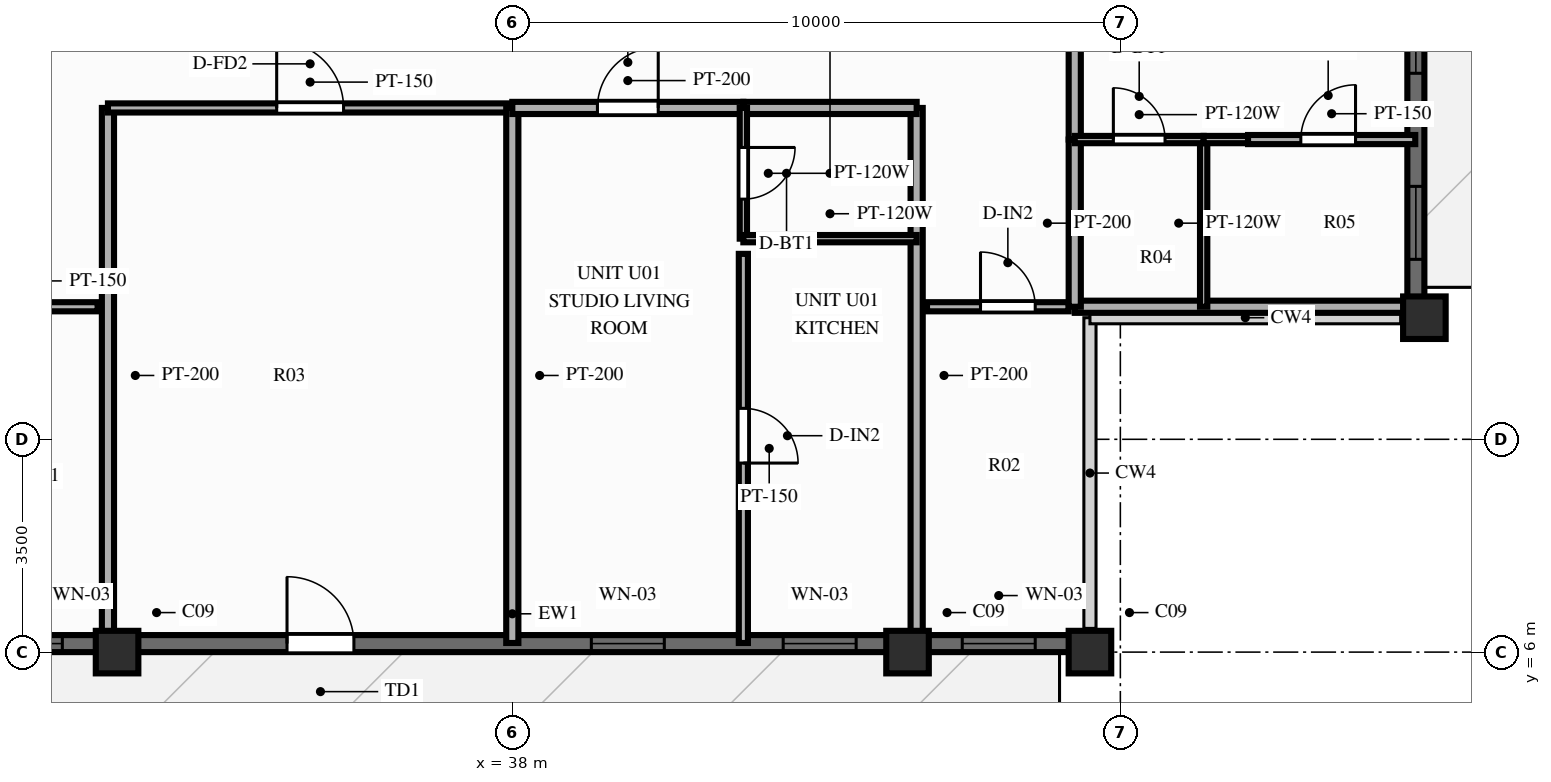
"""IFC4 building model, lengths in metres.
Left out: names, types, materials, properties, quantities, classifications, styles, units other than length and angle.
Written with IfcOpenShell. Run it as: python <this file> out.ifc"""

import sys

from ifc_helpers import new_model, si_unit, direction, frame, frame_2d, origin, origin_2d, place, context, subcontext, project, spatial, rectangle, extrude, source, transform, mapped, element, fill, save


model = new_model("IFC4")
c1 = context("Model", 3, precision=1e-05, world=origin(), true_north=direction((0.0, 1.0)))
c2 = subcontext(c1, "Body", "Model", "MODEL_VIEW")
j1 = project(units=[si_unit("LENGTHUNIT", "METRE"), si_unit("PLANEANGLEUNIT", "RADIAN")], contexts=[c1])
p1 = place(None, origin())
s1 = spatial("IfcSite", under=j1, at=p1, CompositionType="ELEMENT")
p2 = place(p1, origin())
s2 = spatial("IfcBuilding", under=s1, at=p2, CompositionType="ELEMENT")
p3 = place(p2, frame((0.0, 0.0, 246.0)))
s3 = spatial("IfcBuildingStorey", under=s2, at=p3, CompositionType="ELEMENT", Elevation=246.0)
m1 = source(origin(), c2, "Body", "SweptSolid", [
    extrude(rectangle(XDim=0.7, YDim=0.7, at=origin_2d()), origin(), (0.0, 0.0, 1.0), 3.0),
])
for number, where, z_axis, x_axis in (
    (1, (31.5, 6.0, 0.0), (0.0, 0.0, 1.0), (1.0, 0.0, 0.0)),
    (2, (44.5, 6.0, 0.0), (0.0, 0.0, 1.0), (1.0, 0.0, 0.0)),
    (3, (47.5, 6.0, 0.0), (0.0, 0.0, 1.0), (1.0, 0.0, 0.0)),
    (4, (53.0, 11.5, 0.0), (0.0, 0.0, 1.0), (1.0, 0.0, 0.0)),
):
    element("IfcColumn", number, at=place(p3, frame(where, z_axis=z_axis, x_axis=x_axis)), inside=s3, PredefinedType="COLUMN", context=c2, shape_type="MappedRepresentation", body=[
        mapped(m1, transform((0.0, 0.0, 0.0), scale=1.0)),
    ])
p4 = place(p3, frame((28.5, 6.14, 0.0), z_axis=(0.0, 0.0, 1.0), x_axis=(1.0, 0.0, 0.0)))
e5 = element("IfcWall", 5, at=p4, inside=s3, PredefinedType="SOLIDWALL", context=c2, shape_type="SweptSolid", body=[
    extrude(rectangle(XDim=19.0, YDim=0.28, at=frame_2d((9.5, 0.0))), origin(), (0.0, 0.0, 1.0), 2.28),
])
p5 = place(p4, frame((0.9, 0.0, 0.25)))
e6 = element("IfcOpeningElement", 6, at=p5, cuts=e5, PredefinedType="OPENING", context=c2, shape_type="SweptSolid", body=[
    extrude(rectangle(XDim=1.2, YDim=1.5, at=frame_2d((0.6, 0.75))), frame((0.0, 0.152, 0.0), z_axis=(0.0, -1.0, 0.0), x_axis=(1.0, 0.0, 0.0)), (0.0, 0.0, 1.0), 0.304),
])
p6 = place(p4, frame((6.895, 0.0, 0.0), z_axis=(0.0, 0.0, 1.0), x_axis=(-1.0, 0.0, 0.0)))
e7 = element("IfcOpeningElement", 7, at=p6, cuts=e5, PredefinedType="OPENING", context=c2, shape_type="SweptSolid", body=[
    extrude(rectangle(XDim=1.1, YDim=2.15, at=frame_2d((0.55, 1.075))), frame((0.0, 0.152, 0.0), z_axis=(0.0, -1.0, 0.0), x_axis=(1.0, 0.0, 0.0)), (0.0, 0.0, 1.0), 0.304),
])
p7 = place(p4, frame((10.8, 0.0, 0.25)))
e8 = element("IfcOpeningElement", 8, at=p7, cuts=e5, PredefinedType="OPENING", context=c2, shape_type="SweptSolid", body=[
    extrude(rectangle(XDim=1.2, YDim=1.5, at=frame_2d((0.6, 0.75))), frame((0.0, 0.152, 0.0), z_axis=(0.0, -1.0, 0.0), x_axis=(1.0, 0.0, 0.0)), (0.0, 0.0, 1.0), 0.304),
])
p8 = place(p4, frame((13.955, 0.0, 0.25)))
e9 = element("IfcOpeningElement", 9, at=p8, cuts=e5, PredefinedType="OPENING", context=c2, shape_type="SweptSolid", body=[
    extrude(rectangle(XDim=1.2, YDim=1.5, at=frame_2d((0.6, 0.75))), frame((0.0, 0.152, 0.0), z_axis=(0.0, -1.0, 0.0), x_axis=(1.0, 0.0, 0.0)), (0.0, 0.0, 1.0), 0.304),
])
p9 = place(p4, frame((16.9, 0.0, 0.25)))
e10 = element("IfcOpeningElement", 10, at=p9, cuts=e5, PredefinedType="OPENING", context=c2, shape_type="SweptSolid", body=[
    extrude(rectangle(XDim=1.2, YDim=1.5, at=frame_2d((0.6, 0.75))), frame((0.0, 0.152, 0.0), z_axis=(0.0, -1.0, 0.0), x_axis=(1.0, 0.0, 0.0)), (0.0, 0.0, 1.0), 0.304),
])
p10 = place(p3, frame((52.86, 11.5, 0.0), z_axis=(0.0, 0.0, 1.0), x_axis=(0.0, 1.0, 0.0)))
e11 = element("IfcWall", 11, at=p10, inside=s3, PredefinedType="SOLIDWALL", context=c2, shape_type="SweptSolid", body=[
    extrude(rectangle(XDim=31.0, YDim=0.28, at=frame_2d((15.5, 0.0))), origin(), (0.0, 0.0, 1.0), 2.28),
])
p11 = place(p10, frame((0.96, 0.0, 0.25)))
e12 = element("IfcOpeningElement", 12, at=p11, cuts=e11, PredefinedType="OPENING", context=c2, shape_type="SweptSolid", body=[
    extrude(rectangle(XDim=1.2, YDim=1.5, at=frame_2d((0.6, 0.75))), frame((0.0, 0.152, 0.0), z_axis=(0.0, -1.0, 0.0), x_axis=(1.0, 0.0, 0.0)), (0.0, 0.0, 1.0), 0.304),
])
p12 = place(p10, frame((4.02, 0.0, 0.25)))
e13 = element("IfcOpeningElement", 13, at=p12, cuts=e11, PredefinedType="OPENING", context=c2, shape_type="SweptSolid", body=[
    extrude(rectangle(XDim=1.2, YDim=1.5, at=frame_2d((0.6, 0.75))), frame((0.0, 0.152, 0.0), z_axis=(0.0, -1.0, 0.0), x_axis=(1.0, 0.0, 0.0)), (0.0, 0.0, 1.0), 0.304),
])
p13 = place(p10, frame((8.495, 0.0, 0.25)))
e14 = element("IfcOpeningElement", 14, at=p13, cuts=e11, PredefinedType="OPENING", context=c2, shape_type="SweptSolid", body=[
    extrude(rectangle(XDim=1.2, YDim=1.5, at=frame_2d((0.6, 0.75))), frame((0.0, 0.152, 0.0), z_axis=(0.0, -1.0, 0.0), x_axis=(1.0, 0.0, 0.0)), (0.0, 0.0, 1.0), 0.304),
])
p14 = place(p10, frame((12.9, 0.0, 0.25)))
e15 = element("IfcOpeningElement", 15, at=p14, cuts=e11, PredefinedType="OPENING", context=c2, shape_type="SweptSolid", body=[
    extrude(rectangle(XDim=1.2, YDim=1.5, at=frame_2d((0.6, 0.75))), frame((0.0, 0.152, 0.0), z_axis=(0.0, -1.0, 0.0), x_axis=(1.0, 0.0, 0.0)), (0.0, 0.0, 1.0), 0.304),
])
p15 = place(p10, frame((18.75, 0.0, 0.0), z_axis=(0.0, 0.0, 1.0), x_axis=(-1.0, 0.0, 0.0)))
e16 = element("IfcOpeningElement", 16, at=p15, cuts=e11, PredefinedType="OPENING", context=c2, shape_type="SweptSolid", body=[
    extrude(rectangle(XDim=1.6, YDim=2.15, at=frame_2d((0.8, 1.075))), frame((0.0, 0.152, 0.0), z_axis=(0.0, -1.0, 0.0), x_axis=(1.0, 0.0, 0.0)), (0.0, 0.0, 1.0), 0.304),
])
p16 = place(p10, frame((21.755, 0.0, 0.25)))
e17 = element("IfcOpeningElement", 17, at=p16, cuts=e11, PredefinedType="OPENING", context=c2, shape_type="SweptSolid", body=[
    extrude(rectangle(XDim=1.2, YDim=1.5, at=frame_2d((0.6, 0.75))), frame((0.0, 0.152, 0.0), z_axis=(0.0, -1.0, 0.0), x_axis=(1.0, 0.0, 0.0)), (0.0, 0.0, 1.0), 0.304),
])
p17 = place(p10, frame((27.15, 0.0, 0.25)))
e18 = element("IfcOpeningElement", 18, at=p17, cuts=e11, PredefinedType="OPENING", context=c2, shape_type="SweptSolid", body=[
    extrude(rectangle(XDim=1.2, YDim=1.5, at=frame_2d((0.6, 0.75))), frame((0.0, 0.152, 0.0), z_axis=(0.0, -1.0, 0.0), x_axis=(1.0, 0.0, 0.0)), (0.0, 0.0, 1.0), 0.304),
])
p18 = place(p3, frame((28.85, 11.68, 0.0), z_axis=(0.0, 0.0, 1.0), x_axis=(1.0, 0.0, 0.0)))
e19 = element("IfcWall", 19, at=p18, inside=s3, PredefinedType="PARTITIONING", context=c2, shape_type="SweptSolid", body=[
    extrude(rectangle(XDim=2.33, YDim=0.15, at=frame_2d((1.165, 0.0))), origin(), (0.0, 0.0, 1.0), 2.74),
])
p19 = place(p18, frame((0.55, 0.0, 0.0)))
e20 = element("IfcOpeningElement", 20, at=p19, cuts=e19, PredefinedType="OPENING", context=c2, shape_type="SweptSolid", body=[
    extrude(rectangle(XDim=0.9, YDim=2.1, at=frame_2d((0.45, 1.05))), frame((0.0, 0.087, 0.0), z_axis=(0.0, -1.0, 0.0), x_axis=(1.0, 0.0, 0.0)), (0.0, 0.0, 1.0), 0.174),
])
p20 = place(p3, frame((44.82, 11.68, 0.0), z_axis=(0.0, 0.0, 1.0), x_axis=(1.0, 0.0, 0.0)))
e21 = element("IfcWall", 21, at=p20, inside=s3, PredefinedType="PARTITIONING", context=c2, shape_type="SweptSolid", body=[
    extrude(rectangle(XDim=2.33, YDim=0.15, at=frame_2d((1.165, 0.0))), origin(), (0.0, 0.0, 1.0), 2.74),
])
p21 = place(p20, frame((0.88, 0.0, 0.0)))
e22 = element("IfcOpeningElement", 22, at=p21, cuts=e21, PredefinedType="OPENING", context=c2, shape_type="SweptSolid", body=[
    extrude(rectangle(XDim=0.9, YDim=2.1, at=frame_2d((0.45, 1.05))), frame((0.0, 0.087, 0.0), z_axis=(0.0, -1.0, 0.0), x_axis=(1.0, 0.0, 0.0)), (0.0, 0.0, 1.0), 0.174),
])
for number, where, z_axis, x_axis in (
    (23, (31.35, 14.95, 0.0), (0.0, 0.0, 1.0), (0.0, -1.0, 0.0)),
    (24, (44.65, 14.95, 0.0), (0.0, 0.0, 1.0), (0.0, -1.0, 0.0)),
):
    element("IfcWall", number, at=place(p3, frame(where, z_axis=z_axis, x_axis=x_axis)), inside=s3, PredefinedType="PARTITIONING", context=c2, shape_type="SweptSolid", body=[
        extrude(rectangle(XDim=8.8, YDim=0.2, at=frame_2d((4.4, 0.0))), origin(), (0.0, 0.0, 1.0), 2.39),
    ])
p22 = place(p3, frame((31.35, 14.95, 0.0), z_axis=(0.0, 0.0, 1.0), x_axis=(1.0, 0.0, 0.0)))
e25 = element("IfcWall", 25, at=p22, inside=s3, PredefinedType="PARTITIONING", context=c2, shape_type="SweptSolid", body=[
    extrude(rectangle(XDim=6.65, YDim=0.15, at=frame_2d((3.325, 0.0))), origin(), (0.0, 0.0, 1.0), 2.74),
])
p23 = place(p22, frame((2.775, 0.0, 0.0)))
e26 = element("IfcOpeningElement", 26, at=p23, cuts=e25, PredefinedType="OPENING", context=c2, shape_type="SweptSolid", body=[
    extrude(rectangle(XDim=1.1, YDim=2.15, at=frame_2d((0.55, 1.075))), frame((0.0, 0.087, 0.0), z_axis=(0.0, -1.0, 0.0), x_axis=(1.0, 0.0, 0.0)), (0.0, 0.0, 1.0), 0.174),
])
p24 = place(p3, frame((38.0, 14.95, 0.0), z_axis=(0.0, 0.0, 1.0), x_axis=(0.0, -1.0, 0.0)))
e27 = element("IfcWall", 27, at=p24, inside=s3, PredefinedType="PARTITIONING", context=c2, shape_type="SweptSolid", body=[
    extrude(rectangle(XDim=8.8, YDim=0.2, at=frame_2d((4.4, 0.0))), origin(), (0.0, 0.0, 1.0), 2.74),
])
p25 = place(p3, frame((38.0, 14.95, 0.0), z_axis=(0.0, 0.0, 1.0), x_axis=(1.0, 0.0, 0.0)))
e28 = element("IfcWall", 28, at=p25, inside=s3, PredefinedType="PARTITIONING", context=c2, shape_type="SweptSolid", body=[
    extrude(rectangle(XDim=3.8, YDim=0.2, at=frame_2d((1.9, 0.0))), origin(), (0.0, 0.0, 1.0), 2.74),
])
p26 = place(p25, frame((1.4, 0.0, 0.0)))
e29 = element("IfcOpeningElement", 29, at=p26, cuts=e28, PredefinedType="OPENING", context=c2, shape_type="SweptSolid", body=[
    extrude(rectangle(XDim=1.0, YDim=2.15, at=frame_2d((0.5, 1.075))), frame((0.0, 0.112, 0.0), z_axis=(0.0, -1.0, 0.0), x_axis=(1.0, 0.0, 0.0)), (0.0, 0.0, 1.0), 0.224),
])
p27 = place(p3, frame((41.8, 14.95, 0.0), z_axis=(0.0, 0.0, 1.0), x_axis=(1.0, 0.0, 0.0)))
e30 = element("IfcWall", 30, at=p27, inside=s3, PredefinedType="PARTITIONING", context=c2, shape_type="SweptSolid", body=[
    extrude(rectangle(XDim=2.85, YDim=0.2, at=frame_2d((1.425, 0.0))), origin(), (0.0, 0.0, 1.0), 2.74),
])
p28 = place(p3, frame((41.8, 14.95, 0.0), z_axis=(0.0, 0.0, 1.0), x_axis=(0.0, -1.0, 0.0)))
e31 = element("IfcWall", 31, at=p28, inside=s3, PredefinedType="PARTITIONING", context=c2, shape_type="SweptSolid", body=[
    extrude(rectangle(XDim=2.15, YDim=0.12, at=frame_2d((1.075, 0.0))), origin(), (0.0, 0.0, 1.0), 2.74),
])
p29 = place(p28, frame((0.65, 0.0, 0.0)))
e32 = element("IfcOpeningElement", 32, at=p29, cuts=e31, PredefinedType="OPENING", context=c2, shape_type="SweptSolid", body=[
    extrude(rectangle(XDim=0.85, YDim=2.05, at=frame_2d((0.425, 1.025))), frame((0.0, 0.072, 0.0), z_axis=(0.0, -1.0, 0.0), x_axis=(1.0, 0.0, 0.0)), (0.0, 0.0, 1.0), 0.144),
])
p30 = place(p3, frame((41.8, 12.8, 0.0), z_axis=(0.0, 0.0, 1.0), x_axis=(1.0, 0.0, 0.0)))
e33 = element("IfcWall", 33, at=p30, inside=s3, PredefinedType="PARTITIONING", context=c2, shape_type="SweptSolid", body=[
    extrude(rectangle(XDim=2.85, YDim=0.12, at=frame_2d((1.425, 0.0))), origin(), (0.0, 0.0, 1.0), 2.74),
])
p31 = place(p3, frame((41.8, 12.55, 0.0), z_axis=(0.0, 0.0, 1.0), x_axis=(0.0, -1.0, 0.0)))
e34 = element("IfcWall", 34, at=p31, inside=s3, PredefinedType="PARTITIONING", context=c2, shape_type="SweptSolid", body=[
    extrude(rectangle(XDim=6.4, YDim=0.15, at=frame_2d((3.2, 0.0))), origin(), (0.0, 0.0, 1.0), 2.74),
])
p32 = place(p31, frame((2.541, 0.0, 0.0)))
e35 = element("IfcOpeningElement", 35, at=p32, cuts=e34, PredefinedType="OPENING", context=c2, shape_type="SweptSolid", body=[
    extrude(rectangle(XDim=0.9, YDim=2.1, at=frame_2d((0.45, 1.05))), frame((0.0, 0.087, 0.0), z_axis=(0.0, -1.0, 0.0), x_axis=(1.0, 0.0, 0.0)), (0.0, 0.0, 1.0), 0.174),
])
p33 = place(p3, frame((47.25, 11.68, 0.0), z_axis=(0.0, 0.0, 1.0), x_axis=(1.0, 0.0, 0.0)))
e36 = element("IfcWall", 36, at=p33, inside=s3, PredefinedType="PARTITIONING", context=c2, shape_type="SweptSolid", body=[
    extrude(rectangle(XDim=5.6, YDim=0.2, at=frame_2d((2.8, 0.0))), origin(), (0.0, 0.0, 1.0), 2.74),
])
p34 = place(p3, frame((47.25, 11.68, 0.0), z_axis=(0.0, 0.0, 1.0), x_axis=(0.0, 1.0, 0.0)))
e37 = element("IfcWall", 37, at=p34, inside=s3, PredefinedType="PARTITIONING", context=c2, shape_type="SweptSolid", body=[
    extrude(rectangle(XDim=2.75, YDim=0.2, at=frame_2d((1.375, 0.0))), origin(), (0.0, 0.0, 1.0), 2.74),
])
p35 = place(p3, frame((47.25, 14.43, 0.0), z_axis=(0.0, 0.0, 1.0), x_axis=(0.0, 1.0, 0.0)))
e38 = element("IfcWall", 38, at=p35, inside=s3, PredefinedType="PARTITIONING", context=c2, shape_type="SweptSolid", body=[
    extrude(rectangle(XDim=8.57, YDim=0.2, at=frame_2d((4.285, 0.0))), origin(), (0.0, 0.0, 1.0), 2.74),
])
p36 = place(p35, frame((3.785, 0.0, 0.0)))
e39 = element("IfcOpeningElement", 39, at=p36, cuts=e38, PredefinedType="OPENING", context=c2, shape_type="SweptSolid", body=[
    extrude(rectangle(XDim=1.0, YDim=2.15, at=frame_2d((0.5, 1.075))), frame((0.0, 0.112, 0.0), z_axis=(0.0, -1.0, 0.0), x_axis=(1.0, 0.0, 0.0)), (0.0, 0.0, 1.0), 0.224),
])
p37 = place(p3, frame((49.37, 11.68, 0.0), z_axis=(0.0, 0.0, 1.0), x_axis=(0.0, 1.0, 0.0)))
e40 = element("IfcWall", 40, at=p37, inside=s3, PredefinedType="PARTITIONING", context=c2, shape_type="SweptSolid", body=[
    extrude(rectangle(XDim=2.75, YDim=0.12, at=frame_2d((1.375, 0.0))), origin(), (0.0, 0.0, 1.0), 2.74),
])
p38 = place(p3, frame((47.25, 14.43, 0.0), z_axis=(0.0, 0.0, 1.0), x_axis=(1.0, 0.0, 0.0)))
e41 = element("IfcWall", 41, at=p38, inside=s3, PredefinedType="PARTITIONING", context=c2, shape_type="SweptSolid", body=[
    extrude(rectangle(XDim=2.12, YDim=0.12, at=frame_2d((1.06, 0.0))), origin(), (0.0, 0.0, 1.0), 2.74),
])
p39 = place(p38, frame((0.635, 0.0, 0.0)))
e42 = element("IfcOpeningElement", 42, at=p39, cuts=e41, PredefinedType="OPENING", context=c2, shape_type="SweptSolid", body=[
    extrude(rectangle(XDim=0.85, YDim=2.05, at=frame_2d((0.425, 1.025))), frame((0.0, 0.072, 0.0), z_axis=(0.0, -1.0, 0.0), x_axis=(1.0, 0.0, 0.0)), (0.0, 0.0, 1.0), 0.144),
])
p40 = place(p3, frame((49.37, 14.43, 0.0), z_axis=(0.0, 0.0, 1.0), x_axis=(1.0, 0.0, 0.0)))
e43 = element("IfcWall", 43, at=p40, inside=s3, PredefinedType="PARTITIONING", context=c2, shape_type="SweptSolid", body=[
    extrude(rectangle(XDim=0.73, YDim=0.12, at=frame_2d((0.365, 0.0))), origin(), (0.0, 0.0, 1.0), 2.74),
])
p41 = place(p3, frame((50.1, 14.43, 0.0), z_axis=(0.0, 0.0, 1.0), x_axis=(1.0, 0.0, 0.0)))
e44 = element("IfcWall", 44, at=p41, inside=s3, PredefinedType="PARTITIONING", context=c2, shape_type="SweptSolid", body=[
    extrude(rectangle(XDim=2.75, YDim=0.15, at=frame_2d((1.375, 0.0))), origin(), (0.0, 0.0, 1.0), 2.74),
])
p42 = place(p41, frame((0.868, 0.0, 0.0)))
e45 = element("IfcOpeningElement", 45, at=p42, cuts=e44, PredefinedType="OPENING", context=c2, shape_type="SweptSolid", body=[
    extrude(rectangle(XDim=0.9, YDim=2.1, at=frame_2d((0.45, 1.05))), frame((0.0, 0.087, 0.0), z_axis=(0.0, -1.0, 0.0), x_axis=(1.0, 0.0, 0.0)), (0.0, 0.0, 1.0), 0.174),
])
m2 = source(origin(), c2, "Body", "SweptSolid", [
    extrude(rectangle(XDim=1.2, YDim=1.5, at=frame_2d((0.6, 0.75))), frame((0.0, 0.03, 0.0), z_axis=(0.0, -1.0, 0.0), x_axis=(1.0, 0.0, 0.0)), (0.0, 0.0, 1.0), 0.06),
])
p43 = place(p5, origin())
e46 = element("IfcWindow", 46, at=p43, inside=s3, PartitioningType="SINGLE_PANEL", PredefinedType="WINDOW", context=c2, shape_type="MappedRepresentation", body=[
    mapped(m2, transform((0.0, 0.0, 0.0), scale=1.0)),
])
fill(e6, e46)
m3 = source(origin(), c2, "Body", "SweptSolid", [
    extrude(rectangle(XDim=1.1, YDim=2.15, at=frame_2d((0.55, 1.075))), frame((0.0, 0.025, 0.0), z_axis=(0.0, -1.0, 0.0), x_axis=(1.0, 0.0, 0.0)), (0.0, 0.0, 1.0), 0.05),
])
p44 = place(p6, origin())
e47 = element("IfcDoor", 47, at=p44, inside=s3, OperationType="SINGLE_SWING_RIGHT", PredefinedType="DOOR", context=c2, shape_type="MappedRepresentation", body=[
    mapped(m3, transform((0.0, 0.0, 0.0), scale=1.0)),
])
fill(e7, e47)
p45 = place(p7, origin())
e48 = element("IfcWindow", 48, at=p45, inside=s3, PartitioningType="SINGLE_PANEL", PredefinedType="WINDOW", context=c2, shape_type="MappedRepresentation", body=[
    mapped(m2, transform((0.0, 0.0, 0.0), scale=1.0)),
])
fill(e8, e48)
p46 = place(p8, origin())
e49 = element("IfcWindow", 49, at=p46, inside=s3, PartitioningType="SINGLE_PANEL", PredefinedType="WINDOW", context=c2, shape_type="MappedRepresentation", body=[
    mapped(m2, transform((0.0, 0.0, 0.0), scale=1.0)),
])
fill(e9, e49)
p47 = place(p9, origin())
e50 = element("IfcWindow", 50, at=p47, inside=s3, PartitioningType="SINGLE_PANEL", PredefinedType="WINDOW", context=c2, shape_type="MappedRepresentation", body=[
    mapped(m2, transform((0.0, 0.0, 0.0), scale=1.0)),
])
fill(e10, e50)
p48 = place(p11, origin())
e51 = element("IfcWindow", 51, at=p48, inside=s3, PartitioningType="SINGLE_PANEL", PredefinedType="WINDOW", context=c2, shape_type="MappedRepresentation", body=[
    mapped(m2, transform((0.0, 0.0, 0.0), scale=1.0)),
])
fill(e12, e51)
p49 = place(p12, origin())
e52 = element("IfcWindow", 52, at=p49, inside=s3, PartitioningType="SINGLE_PANEL", PredefinedType="WINDOW", context=c2, shape_type="MappedRepresentation", body=[
    mapped(m2, transform((0.0, 0.0, 0.0), scale=1.0)),
])
fill(e13, e52)
m4 = source(origin(), c2, "Body", "SweptSolid", [
    extrude(rectangle(XDim=0.9, YDim=2.1, at=frame_2d((0.45, 1.05))), frame((0.0, 0.025, 0.0), z_axis=(0.0, -1.0, 0.0), x_axis=(1.0, 0.0, 0.0)), (0.0, 0.0, 1.0), 0.05),
])
p50 = place(p21, origin())
e53 = element("IfcDoor", 53, at=p50, inside=s3, OperationType="SINGLE_SWING_LEFT", PredefinedType="DOOR", context=c2, shape_type="MappedRepresentation", body=[
    mapped(m4, transform((0.0, 0.0, 0.0), scale=1.0)),
])
fill(e22, e53)
p51 = place(p23, origin())
e54 = element("IfcDoor", 54, at=p51, inside=s3, OperationType="SINGLE_SWING_LEFT", PredefinedType="DOOR", context=c2, shape_type="MappedRepresentation", body=[
    mapped(m3, transform((0.0, 0.0, 0.0), scale=1.0)),
])
fill(e26, e54)
m5 = source(origin(), c2, "Body", "SweptSolid", [
    extrude(rectangle(XDim=1.0, YDim=2.15, at=frame_2d((0.5, 1.075))), frame((0.0, 0.025, 0.0), z_axis=(0.0, -1.0, 0.0), x_axis=(1.0, 0.0, 0.0)), (0.0, 0.0, 1.0), 0.05),
])
p52 = place(p26, origin())
e55 = element("IfcDoor", 55, at=p52, inside=s3, OperationType="SINGLE_SWING_RIGHT", PredefinedType="DOOR", context=c2, shape_type="MappedRepresentation", body=[
    mapped(m5, transform((0.0, 0.0, 0.0), scale=1.0)),
])
fill(e29, e55)
m6 = source(origin(), c2, "Body", "SweptSolid", [
    extrude(rectangle(XDim=0.85, YDim=2.05, at=frame_2d((0.425, 1.025))), frame((0.0, 0.025, 0.0), z_axis=(0.0, -1.0, 0.0), x_axis=(1.0, 0.0, 0.0)), (0.0, 0.0, 1.0), 0.05),
])
p53 = place(p29, origin())
e56 = element("IfcDoor", 56, at=p53, inside=s3, OperationType="SINGLE_SWING_LEFT", PredefinedType="DOOR", context=c2, shape_type="MappedRepresentation", body=[
    mapped(m6, transform((0.0, 0.0, 0.0), scale=1.0)),
])
fill(e32, e56)
p54 = place(p32, origin())
e57 = element("IfcDoor", 57, at=p54, inside=s3, OperationType="SINGLE_SWING_RIGHT", PredefinedType="DOOR", context=c2, shape_type="MappedRepresentation", body=[
    mapped(m4, transform((0.0, 0.0, 0.0), scale=1.0)),
])
fill(e35, e57)
p55 = place(p39, origin())
e58 = element("IfcDoor", 58, at=p55, inside=s3, OperationType="SINGLE_SWING_LEFT", PredefinedType="DOOR", context=c2, shape_type="MappedRepresentation", body=[
    mapped(m6, transform((0.0, 0.0, 0.0), scale=1.0)),
])
fill(e42, e58)
p56 = place(p42, origin())
e59 = element("IfcDoor", 59, at=p56, inside=s3, OperationType="SINGLE_SWING_RIGHT", PredefinedType="DOOR", context=c2, shape_type="MappedRepresentation", body=[
    mapped(m4, transform((0.0, 0.0, 0.0), scale=1.0)),
])
fill(e45, e59)
save(model, sys.argv[1])
